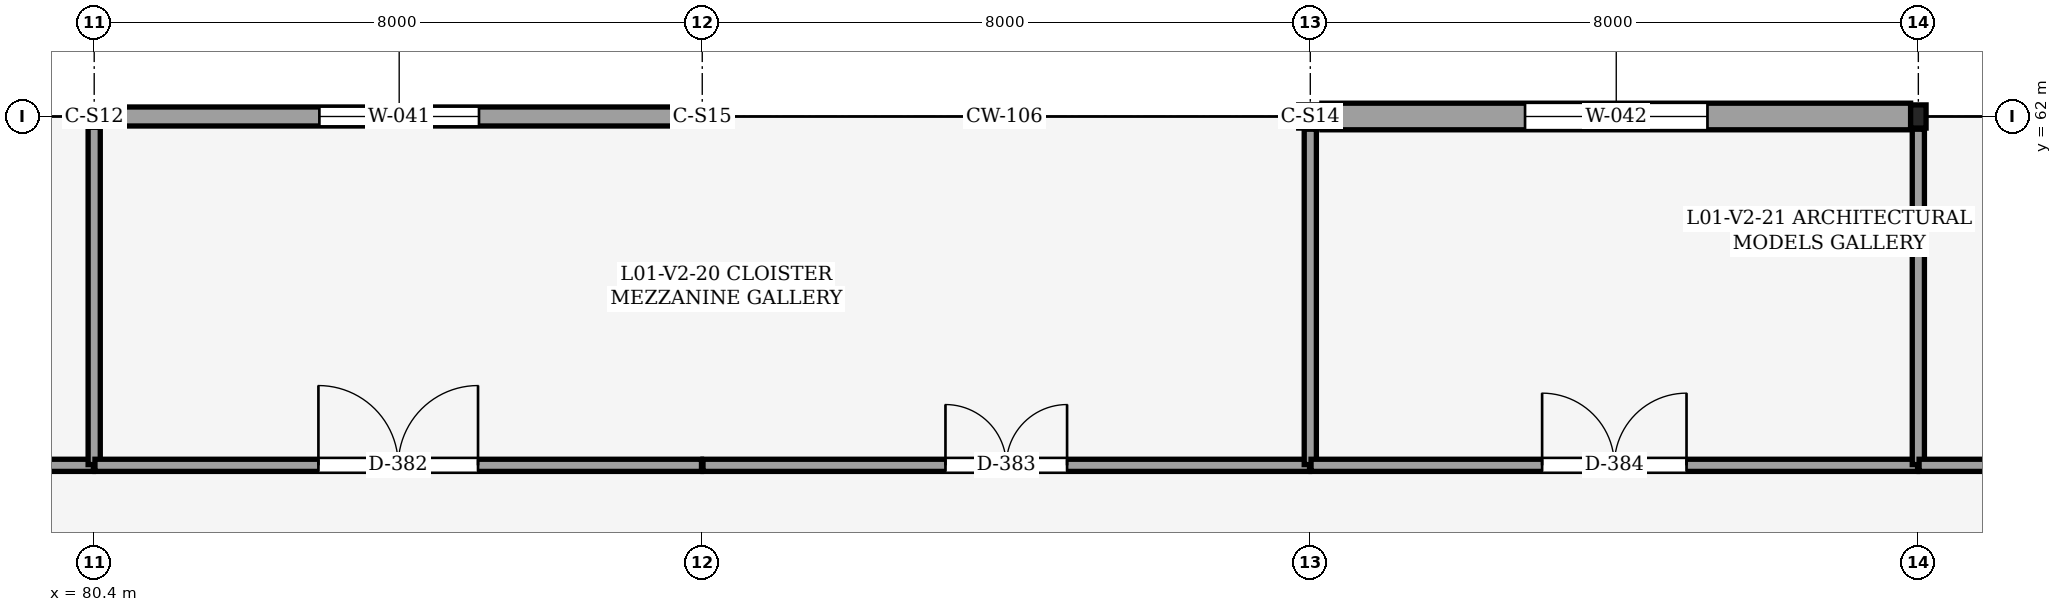
"""IFC4 building model, lengths in metres.
Left out: names, types, materials, properties, quantities, classifications, styles, units other than length and angle.
Written with IfcOpenShell. Run it as: python <this file> out.ifc"""

import sys

from ifc_helpers import new_model, si_unit, direction, frame, frame_2d, origin, origin_2d, place, context, subcontext, project, spatial, rectangle, hollow_rectangle, extrude, element, fill, save


model = new_model("IFC4")
c1 = context("Model", 3, precision=1e-05, world=origin(), true_north=direction((0.0, 1.0)))
c2 = subcontext(c1, "Body", "Model", "MODEL_VIEW")
j1 = project(units=[si_unit("LENGTHUNIT", "METRE"), si_unit("PLANEANGLEUNIT", "RADIAN")], contexts=[c1])
p1 = place(None, origin())
s1 = spatial("IfcSite", under=j1, at=p1, CompositionType="ELEMENT")
p2 = place(p1, origin())
s2 = spatial("IfcBuilding", under=s1, at=p2, CompositionType="ELEMENT")
p3 = place(p2, frame((0.0, 0.0, 5.4)))
s3 = spatial("IfcBuildingStorey", under=s2, at=p3, CompositionType="ELEMENT", Elevation=5.4)
p4 = place(p3, frame((80.4, 62.0, 0.0), z_axis=(0.0, 0.0, 1.0), x_axis=(1.0, 0.0, 0.0)))
e1 = element("IfcColumn", 1, at=p4, inside=s3, PredefinedType="COLUMN", context=c2, shape_type="SweptSolid", body=[
    extrude(hollow_rectangle(XDim=0.254, YDim=0.254, WallThickness=0.013, OuterFilletRadius=0.025, at=origin_2d()), origin(), (0.0, 0.0, 1.0), 4.8),
])
p5 = place(p3, frame((88.4, 62.0, 0.0), z_axis=(0.0, 0.0, 1.0), x_axis=(1.0, 0.0, 0.0)))
e2 = element("IfcColumn", 2, at=p5, inside=s3, PredefinedType="COLUMN", context=c2, shape_type="SweptSolid", body=[
    extrude(hollow_rectangle(XDim=0.203, YDim=0.203, WallThickness=0.013, OuterFilletRadius=0.025, at=origin_2d()), origin(), (0.0, 0.0, 1.0), 4.8),
])
p6 = place(p3, frame((96.4, 62.0, 0.0), z_axis=(0.0, 0.0, 1.0), x_axis=(1.0, 0.0, 0.0)))
e3 = element("IfcColumn", 3, at=p6, inside=s3, PredefinedType="COLUMN", context=c2, shape_type="SweptSolid", body=[
    extrude(hollow_rectangle(XDim=0.305, YDim=0.305, WallThickness=0.016, OuterFilletRadius=0.032, at=origin_2d()), origin(), (0.0, 0.0, 1.0), 4.8),
])
p7 = place(p3, frame((104.4, 62.0, 0.0), z_axis=(0.0, 0.0, 1.0), x_axis=(1.0, 0.0, 0.0)))
e4 = element("IfcColumn", 4, at=p7, inside=s3, PredefinedType="COLUMN", context=c2, shape_type="SweptSolid", body=[
    extrude(hollow_rectangle(XDim=0.203, YDim=0.305, WallThickness=0.013, OuterFilletRadius=0.025, at=origin_2d()), origin(), (0.0, 0.0, 1.0), 4.8),
])
p8 = place(p3, frame((80.527, 62.0, 0.0), z_axis=(0.0, 0.0, 1.0), x_axis=(1.0, 0.0, 0.0)))
e5 = element("IfcWall", 5, at=p8, inside=s3, PredefinedType="SOLIDWALL", context=c2, shape_type="SweptSolid", body=[
    extrude(rectangle(XDim=7.771, YDim=0.25, at=frame_2d((3.886, 0.0))), origin(), (0.0, 0.0, 1.0), 4.266),
])
p9 = place(p8, frame((2.836, 0.0, 0.9)))
e6 = element("IfcOpeningElement", 6, at=p9, cuts=e5, PredefinedType="OPENING", context=c2, shape_type="SweptSolid", body=[
    extrude(rectangle(XDim=2.1, YDim=0.9, at=frame_2d((1.05, 0.45))), frame((0.0, 0.135, 0.0), z_axis=(0.0, -1.0, 0.0), x_axis=(1.0, 0.0, 0.0)), (0.0, 0.0, 1.0), 0.271),
])
p10 = place(p3, frame((96.552, 62.0, 0.0), z_axis=(0.0, 0.0, 1.0), x_axis=(1.0, 0.0, 0.0)))
e7 = element("IfcWall", 7, at=p10, inside=s3, PredefinedType="SOLIDWALL", context=c2, shape_type="SweptSolid", body=[
    extrude(rectangle(XDim=7.746, YDim=0.35, at=frame_2d((3.873, 0.0))), origin(), (0.0, 0.0, 1.0), 4.058),
])
p11 = place(p10, frame((2.673, 0.0, 0.9)))
e8 = element("IfcOpeningElement", 8, at=p11, cuts=e7, PredefinedType="OPENING", context=c2, shape_type="SweptSolid", body=[
    extrude(rectangle(XDim=2.4, YDim=0.9, at=frame_2d((1.2, 0.45))), frame((0.0, 0.185, 0.0), z_axis=(0.0, -1.0, 0.0), x_axis=(1.0, 0.0, 0.0)), (0.0, 0.0, 1.0), 0.371),
])
p12 = place(p3, frame((72.01, 57.41, 0.0), z_axis=(0.0, 0.0, 1.0), x_axis=(1.0, 0.0, 0.0)))
e9 = element("IfcWall", 9, at=p12, inside=s3, PredefinedType="PARTITIONING", context=c2, shape_type="SweptSolid", body=[
    extrude(rectangle(XDim=8.38, YDim=0.16, at=frame_2d((4.19, 0.0))), origin(), (0.0, 0.0, 1.0), 4.52),
])
p13 = place(p12, frame((3.665, 0.0, 0.0)))
e10 = element("IfcOpeningElement", 10, at=p13, cuts=e9, PredefinedType="OPENING", context=c2, shape_type="SweptSolid", body=[
    extrude(rectangle(XDim=1.05, YDim=2.15, at=frame_2d((0.525, 1.075))), frame((0.0, 0.09, 0.0), z_axis=(0.0, -1.0, 0.0), x_axis=(1.0, 0.0, 0.0)), (0.0, 0.0, 1.0), 0.18),
])
p14 = place(p3, frame((80.4, 57.42, 0.0), z_axis=(0.0, 0.0, 1.0), x_axis=(0.0, 1.0, 0.0)))
e11 = element("IfcWall", 11, at=p14, inside=s3, PredefinedType="PARTITIONING", context=c2, shape_type="SweptSolid", body=[
    extrude(rectangle(XDim=4.438, YDim=0.16, at=frame_2d((2.219, 0.0))), origin(), (0.0, 0.0, 1.0), 3.908),
])
p15 = place(p3, frame((80.41, 57.41, 0.0), z_axis=(0.0, 0.0, 1.0), x_axis=(1.0, 0.0, 0.0)))
e12 = element("IfcWall", 12, at=p15, inside=s3, PredefinedType="PARTITIONING", context=c2, shape_type="SweptSolid", body=[
    extrude(rectangle(XDim=7.98, YDim=0.16, at=frame_2d((3.99, 0.0))), origin(), (0.0, 0.0, 1.0), 4.52),
])
p16 = place(p15, frame((2.94, 0.0, 0.0)))
e13 = element("IfcOpeningElement", 13, at=p16, cuts=e12, PredefinedType="OPENING", context=c2, shape_type="SweptSolid", body=[
    extrude(rectangle(XDim=2.1, YDim=2.5, at=frame_2d((1.05, 1.25))), frame((0.0, 0.09, 0.0), z_axis=(0.0, -1.0, 0.0), x_axis=(1.0, 0.0, 0.0)), (0.0, 0.0, 1.0), 0.18),
])
p17 = place(p3, frame((88.41, 57.41, 0.0), z_axis=(0.0, 0.0, 1.0), x_axis=(1.0, 0.0, 0.0)))
e14 = element("IfcWall", 14, at=p17, inside=s3, PredefinedType="PARTITIONING", context=c2, shape_type="SweptSolid", body=[
    extrude(rectangle(XDim=7.98, YDim=0.16, at=frame_2d((3.99, 0.0))), origin(), (0.0, 0.0, 1.0), 4.52),
])
p18 = place(p17, frame((3.19, 0.0, 0.0)))
e15 = element("IfcOpeningElement", 15, at=p18, cuts=e14, PredefinedType="OPENING", context=c2, shape_type="SweptSolid", body=[
    extrude(rectangle(XDim=1.6, YDim=2.35, at=frame_2d((0.8, 1.175))), frame((0.0, 0.09, 0.0), z_axis=(0.0, -1.0, 0.0), x_axis=(1.0, 0.0, 0.0)), (0.0, 0.0, 1.0), 0.18),
])
p19 = place(p3, frame((96.4, 57.42, 0.0), z_axis=(0.0, 0.0, 1.0), x_axis=(0.0, 1.0, 0.0)))
e16 = element("IfcWall", 16, at=p19, inside=s3, PredefinedType="PARTITIONING", context=c2, shape_type="SweptSolid", body=[
    extrude(rectangle(XDim=4.413, YDim=0.16, at=frame_2d((2.206, 0.0))), origin(), (0.0, 0.0, 1.0), 3.987),
])
p20 = place(p3, frame((96.41, 57.41, 0.0), z_axis=(0.0, 0.0, 1.0), x_axis=(1.0, 0.0, 0.0)))
e17 = element("IfcWall", 17, at=p20, inside=s3, PredefinedType="PARTITIONING", context=c2, shape_type="SweptSolid", body=[
    extrude(rectangle(XDim=7.98, YDim=0.16, at=frame_2d((3.99, 0.0))), origin(), (0.0, 0.0, 1.0), 4.52),
])
p21 = place(p20, frame((3.04, 0.0, 0.0)))
e18 = element("IfcOpeningElement", 18, at=p21, cuts=e17, PredefinedType="OPENING", context=c2, shape_type="SweptSolid", body=[
    extrude(rectangle(XDim=1.9, YDim=2.45, at=frame_2d((0.95, 1.225))), frame((0.0, 0.09, 0.0), z_axis=(0.0, -1.0, 0.0), x_axis=(1.0, 0.0, 0.0)), (0.0, 0.0, 1.0), 0.18),
])
p22 = place(p3, frame((104.4, 57.42, 0.0), z_axis=(0.0, 0.0, 1.0), x_axis=(0.0, 1.0, 0.0)))
e19 = element("IfcWall", 19, at=p22, inside=s3, PredefinedType="PARTITIONING", context=c2, shape_type="SweptSolid", body=[
    extrude(rectangle(XDim=4.413, YDim=0.16, at=frame_2d((2.206, 0.0))), origin(), (0.0, 0.0, 1.0), 4.058),
])
p23 = place(p3, frame((104.41, 57.41, 0.0), z_axis=(0.0, 0.0, 1.0), x_axis=(1.0, 0.0, 0.0)))
e20 = element("IfcWall", 20, at=p23, inside=s3, PredefinedType="PARTITIONING", context=c2, shape_type="SweptSolid", body=[
    extrude(rectangle(XDim=8.33, YDim=0.16, at=frame_2d((4.165, 0.0))), origin(), (0.0, 0.0, 1.0), 4.52),
])
p24 = place(p23, frame((3.64, 0.0, 0.0)))
e21 = element("IfcOpeningElement", 21, at=p24, cuts=e20, PredefinedType="OPENING", context=c2, shape_type="SweptSolid", body=[
    extrude(rectangle(XDim=1.05, YDim=2.15, at=frame_2d((0.525, 1.075))), frame((0.0, 0.09, 0.0), z_axis=(0.0, -1.0, 0.0), x_axis=(1.0, 0.0, 0.0)), (0.0, 0.0, 1.0), 0.18),
])
p25 = place(p9, origin())
e22 = element("IfcWindow", 22, at=p25, inside=s3, PartitioningType="SINGLE_PANEL", PredefinedType="WINDOW", context=c2, shape_type="SweptSolid", body=[
    extrude(rectangle(XDim=2.1, YDim=0.9, at=frame_2d((1.05, 0.45))), frame((0.0, 0.03, 0.0), z_axis=(0.0, -1.0, 0.0), x_axis=(1.0, 0.0, 0.0)), (0.0, 0.0, 1.0), 0.06),
])
fill(e6, e22)
p26 = place(p11, origin())
e23 = element("IfcWindow", 23, at=p26, inside=s3, PartitioningType="SINGLE_PANEL", PredefinedType="WINDOW", context=c2, shape_type="SweptSolid", body=[
    extrude(rectangle(XDim=2.4, YDim=0.9, at=frame_2d((1.2, 0.45))), frame((0.0, 0.03, 0.0), z_axis=(0.0, -1.0, 0.0), x_axis=(1.0, 0.0, 0.0)), (0.0, 0.0, 1.0), 0.06),
])
fill(e8, e23)
p27 = place(p16, origin())
e24 = element("IfcDoor", 24, at=p27, inside=s3, OperationType="DOUBLE_DOOR_SINGLE_SWING", PredefinedType="DOOR", context=c2, shape_type="SweptSolid", body=[
    extrude(rectangle(XDim=2.1, YDim=2.5, at=frame_2d((1.05, 1.25))), frame((0.0, 0.025, 0.0), z_axis=(0.0, -1.0, 0.0), x_axis=(1.0, 0.0, 0.0)), (0.0, 0.0, 1.0), 0.05),
])
fill(e13, e24)
p28 = place(p18, origin())
e25 = element("IfcDoor", 25, at=p28, inside=s3, OperationType="DOUBLE_DOOR_SINGLE_SWING", PredefinedType="DOOR", context=c2, shape_type="SweptSolid", body=[
    extrude(rectangle(XDim=1.6, YDim=2.35, at=frame_2d((0.8, 1.175))), frame((0.0, 0.025, 0.0), z_axis=(0.0, -1.0, 0.0), x_axis=(1.0, 0.0, 0.0)), (0.0, 0.0, 1.0), 0.05),
])
fill(e15, e25)
p29 = place(p21, origin())
e26 = element("IfcDoor", 26, at=p29, inside=s3, OperationType="DOUBLE_DOOR_SINGLE_SWING", PredefinedType="DOOR", context=c2, shape_type="SweptSolid", body=[
    extrude(rectangle(XDim=1.9, YDim=2.45, at=frame_2d((0.95, 1.225))), frame((0.0, 0.025, 0.0), z_axis=(0.0, -1.0, 0.0), x_axis=(1.0, 0.0, 0.0)), (0.0, 0.0, 1.0), 0.05),
])
fill(e18, e26)
save(model, sys.argv[1])
